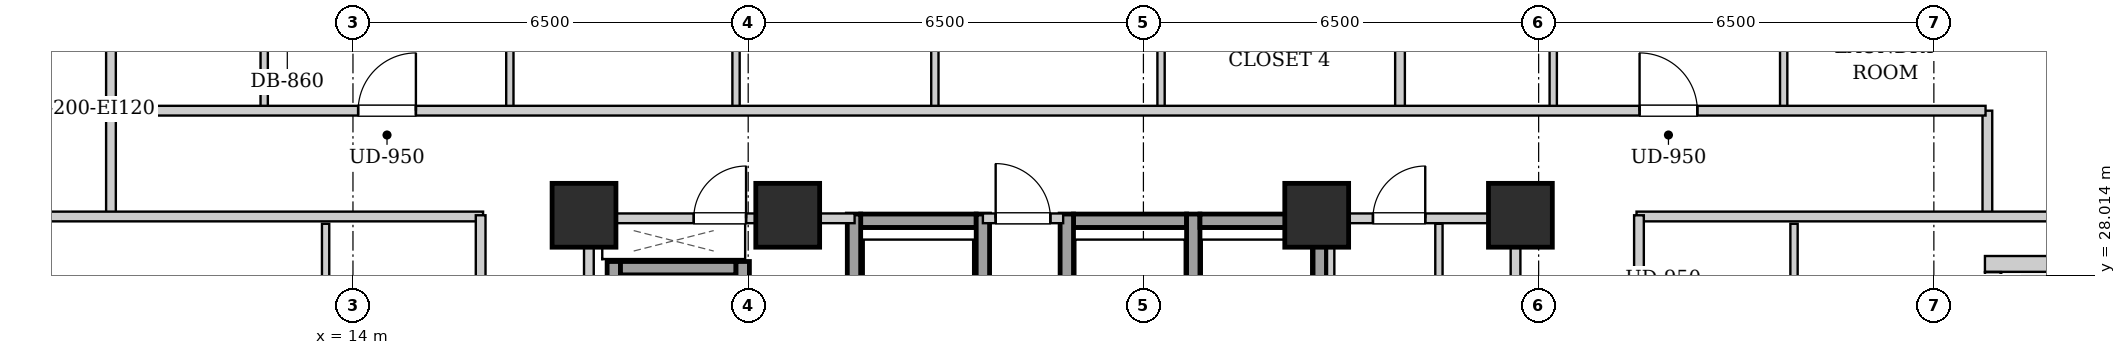
"""IFC4 building model, lengths in metres.
Left out: names, types, materials, properties, quantities, classifications, styles, units other than length and angle.
Written with IfcOpenShell. Run it as: python <this file> out.ifc"""

import sys

from ifc_helpers import new_model, si_unit, direction, frame, frame_2d, origin, origin_2d, place, context, subcontext, project, spatial, rectangle, extrude, element, fill, save


model = new_model("IFC4")
c1 = context("Model", 3, precision=1e-05, world=origin(), true_north=direction((0.0, 1.0)))
c2 = subcontext(c1, "Body", "Model", "MODEL_VIEW")
j1 = project(units=[si_unit("LENGTHUNIT", "METRE"), si_unit("PLANEANGLEUNIT", "RADIAN")], contexts=[c1])
p1 = place(None, origin())
s1 = spatial("IfcSite", under=j1, at=p1, CompositionType="ELEMENT")
p2 = place(p1, origin())
s2 = spatial("IfcBuilding", under=s1, at=p2, CompositionType="ELEMENT")
p3 = place(p2, frame((0.0, 0.0, 113.5)))
s3 = spatial("IfcBuildingStorey", under=s2, at=p3, CompositionType="ELEMENT", Elevation=113.5)
for number, where, z_axis, x_axis in (
    (1, (17.8, 29.0, 0.0), (0.0, 0.0, 1.0), (1.0, 0.0, 0.0)),
    (2, (21.15, 29.0, 0.0), (0.0, 0.0, 1.0), (1.0, 0.0, 0.0)),
    (3, (29.85, 29.0, 0.0), (0.0, 0.0, 1.0), (1.0, 0.0, 0.0)),
    (4, (33.2, 29.0, 0.0), (0.0, 0.0, 1.0), (1.0, 0.0, 0.0)),
):
    element("IfcColumn", number, at=place(p3, frame(where, z_axis=z_axis, x_axis=x_axis)), inside=s3, PredefinedType="COLUMN", context=c2, shape_type="SweptSolid", body=[
        extrude(rectangle(XDim=1.05, YDim=1.05, at=origin_2d()), origin(), (0.0, 0.0, 1.0), 3.2),
    ])
p4 = place(p3, frame((43.24, 28.2, 0.0), z_axis=(0.0, 0.0, 1.0), x_axis=(-1.0, 0.0, 0.0)))
e5 = element("IfcWall", 5, at=p4, inside=s3, PredefinedType="SOLIDWALL", context=c2, shape_type="SweptSolid", body=[
    extrude(rectangle(XDim=2.4, YDim=0.26, at=frame_2d((1.2, 0.0))), origin(), (0.0, 0.0, 1.0), 2.94),
])
p5 = place(p3, frame((40.97, 28.066, 0.0), z_axis=(0.0, 0.0, 1.0), x_axis=(0.0, -1.0, 0.0)))
e6 = element("IfcWall", 6, at=p5, inside=s3, PredefinedType="SOLIDWALL", context=c2, shape_type="SweptSolid", body=[
    extrude(rectangle(XDim=3.332, YDim=0.26, at=frame_2d((1.666, 0.0))), origin(), (0.0, 0.0, 1.0), 2.94),
])
p6 = place(p5, frame((1.116, 0.0, 0.0)))
e7 = element("IfcOpeningElement", 7, at=p6, cuts=e6, PredefinedType="OPENING", context=c2, shape_type="SweptSolid", body=[
    extrude(rectangle(XDim=1.1, YDim=2.0, at=frame_2d((0.55, 1.0))), frame((0.0, 0.14, 0.0), z_axis=(0.0, -1.0, 0.0), x_axis=(1.0, 0.0, 0.0)), (0.0, 0.0, 1.0), 0.28),
])
p7 = place(p5, frame((0.276, 0.0, 0.55)))
e8 = element("IfcOpeningElement", 8, at=p7, cuts=e6, PredefinedType="OPENING", context=c2, shape_type="SweptSolid", body=[
    extrude(rectangle(XDim=0.68, YDim=1.2, at=frame_2d((0.34, 0.6))), frame((0.0, 0.14, 0.0), z_axis=(0.0, -1.0, 0.0), x_axis=(1.0, 0.0, 0.0)), (0.0, 0.0, 1.0), 0.28),
])
p8 = place(p3, frame((22.35, 28.91, 0.0), z_axis=(0.0, 0.0, 1.0), x_axis=(1.0, 0.0, 0.0)))
e9 = element("IfcWall", 9, at=p8, inside=s3, PredefinedType="SHEAR", context=c2, shape_type="SweptSolid", body=[
    extrude(rectangle(XDim=1.9, YDim=0.22, at=frame_2d((0.95, 0.0))), origin(), (0.0, 0.0, 1.0), 2.94),
])
for number, where, z_axis, x_axis in (
    (10, (22.24, 26.58, 0.0), (0.0, 0.0, 1.0), (0.0, 1.0, 0.0)),
    (11, (24.36, 26.58, 0.0), (0.0, 0.0, 1.0), (0.0, 1.0, 0.0)),
):
    element("IfcWall", number, at=place(p3, frame(where, z_axis=z_axis, x_axis=x_axis)), inside=s3, PredefinedType="SHEAR", context=c2, shape_type="SweptSolid", body=[
        extrude(rectangle(XDim=2.44, YDim=0.22, at=frame_2d((1.22, 0.0))), origin(), (0.0, 0.0, 1.0), 2.94),
    ])
p9 = place(p3, frame((25.85, 28.91, 0.0), z_axis=(0.0, 0.0, 1.0), x_axis=(1.0, 0.0, 0.0)))
e12 = element("IfcWall", 12, at=p9, inside=s3, PredefinedType="SHEAR", context=c2, shape_type="SweptSolid", body=[
    extrude(rectangle(XDim=1.86, YDim=0.22, at=frame_2d((0.93, 0.0))), origin(), (0.0, 0.0, 1.0), 2.94),
])
for number, where, z_axis, x_axis in (
    (13, (25.74, 26.58, 0.0), (0.0, 0.0, 1.0), (0.0, 1.0, 0.0)),
    (14, (27.82, 26.58, 0.0), (0.0, 0.0, 1.0), (0.0, 1.0, 0.0)),
):
    element("IfcWall", number, at=place(p3, frame(where, z_axis=z_axis, x_axis=x_axis)), inside=s3, PredefinedType="SHEAR", context=c2, shape_type="SweptSolid", body=[
        extrude(rectangle(XDim=2.44, YDim=0.22, at=frame_2d((1.22, 0.0))), origin(), (0.0, 0.0, 1.0), 2.94),
    ])
p10 = place(p3, frame((27.93, 28.91, 0.0), z_axis=(0.0, 0.0, 1.0), x_axis=(1.0, 0.0, 0.0)))
e15 = element("IfcWall", 15, at=p10, inside=s3, PredefinedType="SHEAR", context=c2, shape_type="SweptSolid", body=[
    extrude(rectangle(XDim=1.86, YDim=0.22, at=frame_2d((0.93, 0.0))), origin(), (0.0, 0.0, 1.0), 2.94),
])
p11 = place(p3, frame((29.9, 26.58, 0.0), z_axis=(0.0, 0.0, 1.0), x_axis=(0.0, 1.0, 0.0)))
e16 = element("IfcWall", 16, at=p11, inside=s3, PredefinedType="SHEAR", context=c2, shape_type="SweptSolid", body=[
    extrude(rectangle(XDim=2.44, YDim=0.22, at=frame_2d((1.22, 0.0))), origin(), (0.0, 0.0, 1.0), 2.94),
])
p12 = place(p3, frame((18.29, 24.1, 0.0), z_axis=(0.0, 0.0, 1.0), x_axis=(0.0, 1.0, 0.0)))
e17 = element("IfcWall", 17, at=p12, inside=s3, PredefinedType="SHEAR", context=c2, shape_type="SweptSolid", body=[
    extrude(rectangle(XDim=4.14, YDim=0.22, at=frame_2d((2.07, 0.0))), origin(), (0.0, 0.0, 1.0), 2.94),
])
p13 = place(p3, frame((18.4, 28.13, 0.0), z_axis=(0.0, 0.0, 1.0), x_axis=(1.0, 0.0, 0.0)))
e18 = element("IfcWall", 18, at=p13, inside=s3, PredefinedType="SHEAR", context=c2, shape_type="SweptSolid", body=[
    extrude(rectangle(XDim=1.9, YDim=0.22, at=frame_2d((0.95, 0.0))), origin(), (0.0, 0.0, 1.0), 2.94),
])
p14 = place(p3, frame((20.41, 26.06, 0.0), z_axis=(0.0, 0.0, 1.0), x_axis=(0.0, 1.0, 0.0)))
e19 = element("IfcWall", 19, at=p14, inside=s3, PredefinedType="SHEAR", context=c2, shape_type="SweptSolid", body=[
    extrude(rectangle(XDim=2.18, YDim=0.22, at=frame_2d((1.09, 0.0))), origin(), (0.0, 0.0, 1.0), 2.94),
])
for number, where, z_axis, x_axis in (
    (20, (17.88, 24.12, 0.0), (0.0, 0.0, 1.0), (0.0, 1.0, 0.0)),
    (21, (33.12, 24.12, 0.0), (0.0, 0.0, 1.0), (0.0, 1.0, 0.0)),
):
    element("IfcWall", number, at=place(p3, frame(where, z_axis=z_axis, x_axis=x_axis)), inside=s3, PredefinedType="PARTITIONING", context=c2, shape_type="SweptSolid", body=[
        extrude(rectangle(XDim=4.76, YDim=0.16, at=frame_2d((2.38, 0.0))), origin(), (0.0, 0.0, 1.0), 2.94),
    ])
p15 = place(p3, frame((24.36, 28.95, 0.0), z_axis=(0.0, 0.0, 1.0), x_axis=(1.0, 0.0, 0.0)))
e22 = element("IfcWall", 22, at=p15, inside=s3, PredefinedType="PARTITIONING", context=c2, shape_type="SweptSolid", body=[
    extrude(rectangle(XDim=1.32, YDim=0.16, at=frame_2d((0.66, 0.0))), origin(), (0.0, 0.0, 1.0), 2.313),
])
p16 = place(p15, frame((0.21, 0.0, 0.0)))
e23 = element("IfcOpeningElement", 23, at=p16, cuts=e22, PredefinedType="OPENING", context=c2, shape_type="SweptSolid", body=[
    extrude(rectangle(XDim=0.9, YDim=2.05, at=frame_2d((0.45, 1.025))), frame((0.0, 0.09, 0.0), z_axis=(0.0, -1.0, 0.0), x_axis=(1.0, 0.0, 0.0)), (0.0, 0.0, 1.0), 0.18),
])
p17 = place(p3, frame((17.96, 28.95, 0.0), z_axis=(0.0, 0.0, 1.0), x_axis=(1.0, 0.0, 0.0)))
e24 = element("IfcWall", 24, at=p17, inside=s3, PredefinedType="PARTITIONING", context=c2, shape_type="SweptSolid", body=[
    extrude(rectangle(XDim=4.29, YDim=0.16, at=frame_2d((2.145, 0.0))), origin(), (0.0, 0.0, 1.0), 2.313),
])
p18 = place(p17, frame((1.645, 0.0, 0.0)))
e25 = element("IfcOpeningElement", 25, at=p18, cuts=e24, PredefinedType="OPENING", context=c2, shape_type="SweptSolid", body=[
    extrude(rectangle(XDim=0.86, YDim=2.05, at=frame_2d((0.43, 1.025))), frame((0.0, 0.09, 0.0), z_axis=(0.0, -1.0, 0.0), x_axis=(1.0, 0.0, 0.0)), (0.0, 0.0, 1.0), 0.18),
])
p19 = place(p3, frame((30.08, 26.18, 0.0), z_axis=(0.0, 0.0, 1.0), x_axis=(0.0, 1.0, 0.0)))
e26 = element("IfcWall", 26, at=p19, inside=s3, PredefinedType="PARTITIONING", context=c2, shape_type="SweptSolid", body=[
    extrude(rectangle(XDim=2.68, YDim=0.12, at=frame_2d((1.34, 0.0))), origin(), (0.0, 0.0, 1.0), 2.94),
])
p20 = place(p3, frame((31.86, 26.2, 0.0), z_axis=(0.0, 0.0, 1.0), x_axis=(0.0, 1.0, 0.0)))
e27 = element("IfcWall", 27, at=p20, inside=s3, PredefinedType="PARTITIONING", context=c2, shape_type="SweptSolid", body=[
    extrude(rectangle(XDim=2.66, YDim=0.12, at=frame_2d((1.33, 0.0))), origin(), (0.0, 0.0, 1.0), 2.94),
])
p21 = place(p20, frame((0.92, 0.0, 0.0)))
e28 = element("IfcOpeningElement", 28, at=p21, cuts=e27, PredefinedType="OPENING", context=c2, shape_type="SweptSolid", body=[
    extrude(rectangle(XDim=0.86, YDim=2.05, at=frame_2d((0.43, 1.025))), frame((0.0, 0.07, 0.0), z_axis=(0.0, -1.0, 0.0), x_axis=(1.0, 0.0, 0.0)), (0.0, 0.0, 1.0), 0.14),
])
p22 = place(p3, frame((30.08, 28.95, 0.0), z_axis=(0.0, 0.0, 1.0), x_axis=(1.0, 0.0, 0.0)))
e29 = element("IfcWall", 29, at=p22, inside=s3, PredefinedType="PARTITIONING", context=c2, shape_type="SweptSolid", body=[
    extrude(rectangle(XDim=2.96, YDim=0.16, at=frame_2d((1.48, 0.0))), origin(), (0.0, 0.0, 1.0), 2.94),
])
p23 = place(p22, frame((0.695, 0.0, 0.0)))
e30 = element("IfcOpeningElement", 30, at=p23, cuts=e29, PredefinedType="OPENING", context=c2, shape_type="SweptSolid", body=[
    extrude(rectangle(XDim=0.86, YDim=2.05, at=frame_2d((0.43, 1.025))), frame((0.0, 0.09, 0.0), z_axis=(0.0, -1.0, 0.0), x_axis=(1.0, 0.0, 0.0)), (0.0, 0.0, 1.0), 0.18),
])
for number, where, z_axis, x_axis in (
    (31, (10.02, 28.98, 0.0), (0.0, 0.0, 1.0), (0.0, 1.0, 0.0)),
    (32, (40.88, 28.98, 0.0), (0.0, 0.0, 1.0), (0.0, 1.0, 0.0)),
):
    element("IfcWall", number, at=place(p3, frame(where, z_axis=z_axis, x_axis=x_axis)), inside=s3, PredefinedType="PARTITIONING", context=c2, shape_type="SweptSolid", body=[
        extrude(rectangle(XDim=1.74, YDim=0.16, at=frame_2d((0.87, 0.0))), origin(), (0.0, 0.0, 1.0), 2.94),
    ])
p24 = place(p3, frame((7.78, 28.98, 0.0), z_axis=(0.0, 0.0, 1.0), x_axis=(1.0, 0.0, 0.0)))
e33 = element("IfcWall", 33, at=p24, inside=s3, PredefinedType="PARTITIONING", context=c2, shape_type="SweptSolid", body=[
    extrude(rectangle(XDim=8.36, YDim=0.16, at=frame_2d((4.18, 0.0))), origin(), (0.0, 0.0, 1.0), 2.313),
])
p25 = place(p3, frame((35.11, 28.98, 0.0), z_axis=(0.0, 0.0, 1.0), x_axis=(1.0, 0.0, 0.0)))
e34 = element("IfcWall", 34, at=p25, inside=s3, PredefinedType="PARTITIONING", context=c2, shape_type="SweptSolid", body=[
    extrude(rectangle(XDim=8.01, YDim=0.16, at=frame_2d((4.005, 0.0))), origin(), (0.0, 0.0, 1.0), 2.313),
])
p26 = place(p3, frame((10.02, 30.76, 0.0), z_axis=(0.0, 0.0, 1.0), x_axis=(0.0, 1.0, 0.0)))
e35 = element("IfcWall", 35, at=p26, inside=s3, PredefinedType="PARTITIONING", context=c2, shape_type="SweptSolid", body=[
    extrude(rectangle(XDim=2.91, YDim=0.16, at=frame_2d((1.455, 0.0))), origin(), (0.0, 0.0, 1.0), 2.94),
])
p27 = place(p3, frame((12.54, 30.76, 0.0), z_axis=(0.0, 0.0, 1.0), x_axis=(0.0, 1.0, 0.0)))
e36 = element("IfcWall", 36, at=p27, inside=s3, PredefinedType="PARTITIONING", context=c2, shape_type="SweptSolid", body=[
    extrude(rectangle(XDim=2.85, YDim=0.12, at=frame_2d((1.425, 0.0))), origin(), (0.0, 0.0, 1.0), 2.94),
])
p28 = place(p27, frame((0.995, 0.0, 0.0)))
e37 = element("IfcOpeningElement", 37, at=p28, cuts=e36, PredefinedType="OPENING", context=c2, shape_type="SweptSolid", body=[
    extrude(rectangle(XDim=0.86, YDim=2.05, at=frame_2d((0.43, 1.025))), frame((0.0, 0.07, 0.0), z_axis=(0.0, -1.0, 0.0), x_axis=(1.0, 0.0, 0.0)), (0.0, 0.0, 1.0), 0.14),
])
p29 = place(p3, frame((16.58, 30.76, 0.0), z_axis=(0.0, 0.0, 1.0), x_axis=(0.0, 1.0, 0.0)))
e38 = element("IfcWall", 38, at=p29, inside=s3, PredefinedType="PARTITIONING", context=c2, shape_type="SweptSolid", body=[
    extrude(rectangle(XDim=2.85, YDim=0.12, at=frame_2d((1.425, 0.0))), origin(), (0.0, 0.0, 1.0), 2.94),
])
p30 = place(p29, frame((0.975, 0.0, 0.0)))
e39 = element("IfcOpeningElement", 39, at=p30, cuts=e38, PredefinedType="OPENING", context=c2, shape_type="SweptSolid", body=[
    extrude(rectangle(XDim=0.9, YDim=2.05, at=frame_2d((0.45, 1.025))), frame((0.0, 0.07, 0.0), z_axis=(0.0, -1.0, 0.0), x_axis=(1.0, 0.0, 0.0)), (0.0, 0.0, 1.0), 0.14),
])
p31 = place(p3, frame((20.3, 30.76, 0.0), z_axis=(0.0, 0.0, 1.0), x_axis=(0.0, 1.0, 0.0)))
e40 = element("IfcWall", 40, at=p31, inside=s3, PredefinedType="PARTITIONING", context=c2, shape_type="SweptSolid", body=[
    extrude(rectangle(XDim=2.85, YDim=0.12, at=frame_2d((1.425, 0.0))), origin(), (0.0, 0.0, 1.0), 2.94),
])
p32 = place(p31, frame((0.975, 0.0, 0.0)))
e41 = element("IfcOpeningElement", 41, at=p32, cuts=e40, PredefinedType="OPENING", context=c2, shape_type="SweptSolid", body=[
    extrude(rectangle(XDim=0.9, YDim=2.05, at=frame_2d((0.45, 1.025))), frame((0.0, 0.07, 0.0), z_axis=(0.0, -1.0, 0.0), x_axis=(1.0, 0.0, 0.0)), (0.0, 0.0, 1.0), 0.14),
])
p33 = place(p3, frame((23.57, 30.76, 0.0), z_axis=(0.0, 0.0, 1.0), x_axis=(0.0, 1.0, 0.0)))
e42 = element("IfcWall", 42, at=p33, inside=s3, PredefinedType="PARTITIONING", context=c2, shape_type="SweptSolid", body=[
    extrude(rectangle(XDim=2.85, YDim=0.12, at=frame_2d((1.425, 0.0))), origin(), (0.0, 0.0, 1.0), 2.94),
])
p34 = place(p33, frame((0.975, 0.0, 0.0)))
e43 = element("IfcOpeningElement", 43, at=p34, cuts=e42, PredefinedType="OPENING", context=c2, shape_type="SweptSolid", body=[
    extrude(rectangle(XDim=0.9, YDim=2.05, at=frame_2d((0.45, 1.025))), frame((0.0, 0.07, 0.0), z_axis=(0.0, -1.0, 0.0), x_axis=(1.0, 0.0, 0.0)), (0.0, 0.0, 1.0), 0.14),
])
p35 = place(p3, frame((27.29, 30.76, 0.0), z_axis=(0.0, 0.0, 1.0), x_axis=(0.0, 1.0, 0.0)))
e44 = element("IfcWall", 44, at=p35, inside=s3, PredefinedType="PARTITIONING", context=c2, shape_type="SweptSolid", body=[
    extrude(rectangle(XDim=2.85, YDim=0.12, at=frame_2d((1.425, 0.0))), origin(), (0.0, 0.0, 1.0), 2.94),
])
p36 = place(p35, frame((0.975, 0.0, 0.0)))
e45 = element("IfcOpeningElement", 45, at=p36, cuts=e44, PredefinedType="OPENING", context=c2, shape_type="SweptSolid", body=[
    extrude(rectangle(XDim=0.9, YDim=2.05, at=frame_2d((0.45, 1.025))), frame((0.0, 0.07, 0.0), z_axis=(0.0, -1.0, 0.0), x_axis=(1.0, 0.0, 0.0)), (0.0, 0.0, 1.0), 0.14),
])
p37 = place(p3, frame((31.22, 30.76, 0.0), z_axis=(0.0, 0.0, 1.0), x_axis=(0.0, 1.0, 0.0)))
e46 = element("IfcWall", 46, at=p37, inside=s3, PredefinedType="PARTITIONING", context=c2, shape_type="SweptSolid", body=[
    extrude(rectangle(XDim=12.26, YDim=0.16, at=frame_2d((6.13, 0.0))), origin(), (0.0, 0.0, 1.0), 2.94),
])
p38 = place(p3, frame((33.74, 30.76, 0.0), z_axis=(0.0, 0.0, 1.0), x_axis=(0.0, 1.0, 0.0)))
e47 = element("IfcWall", 47, at=p38, inside=s3, PredefinedType="PARTITIONING", context=c2, shape_type="SweptSolid", body=[
    extrude(rectangle(XDim=2.85, YDim=0.12, at=frame_2d((1.425, 0.0))), origin(), (0.0, 0.0, 1.0), 2.94),
])
p39 = place(p38, frame((0.995, 0.0, 0.0)))
e48 = element("IfcOpeningElement", 48, at=p39, cuts=e47, PredefinedType="OPENING", context=c2, shape_type="SweptSolid", body=[
    extrude(rectangle(XDim=0.86, YDim=2.05, at=frame_2d((0.43, 1.025))), frame((0.0, 0.07, 0.0), z_axis=(0.0, -1.0, 0.0), x_axis=(1.0, 0.0, 0.0)), (0.0, 0.0, 1.0), 0.14),
])
p40 = place(p3, frame((37.53, 30.76, 0.0), z_axis=(0.0, 0.0, 1.0), x_axis=(0.0, 1.0, 0.0)))
e49 = element("IfcWall", 49, at=p40, inside=s3, PredefinedType="PARTITIONING", context=c2, shape_type="SweptSolid", body=[
    extrude(rectangle(XDim=2.85, YDim=0.12, at=frame_2d((1.425, 0.0))), origin(), (0.0, 0.0, 1.0), 2.94),
])
p41 = place(p40, frame((0.975, 0.0, 0.0)))
e50 = element("IfcOpeningElement", 50, at=p41, cuts=e49, PredefinedType="OPENING", context=c2, shape_type="SweptSolid", body=[
    extrude(rectangle(XDim=0.9, YDim=2.05, at=frame_2d((0.45, 1.025))), frame((0.0, 0.07, 0.0), z_axis=(0.0, -1.0, 0.0), x_axis=(1.0, 0.0, 0.0)), (0.0, 0.0, 1.0), 0.14),
])
p42 = place(p3, frame((13.55, 25.052, 0.0), z_axis=(0.0, 0.0, 1.0), x_axis=(0.0, 1.0, 0.0)))
e51 = element("IfcWall", 51, at=p42, inside=s3, PredefinedType="PARTITIONING", context=c2, shape_type="SweptSolid", body=[
    extrude(rectangle(XDim=3.808, YDim=0.12, at=frame_2d((1.904, 0.0))), origin(), (0.0, 0.0, 1.0), 2.94),
])
p43 = place(p42, frame((1.454, 0.0, 0.0)))
e52 = element("IfcOpeningElement", 52, at=p43, cuts=e51, PredefinedType="OPENING", context=c2, shape_type="SweptSolid", body=[
    extrude(rectangle(XDim=0.9, YDim=2.05, at=frame_2d((0.45, 1.025))), frame((0.0, 0.07, 0.0), z_axis=(0.0, -1.0, 0.0), x_axis=(1.0, 0.0, 0.0)), (0.0, 0.0, 1.0), 0.14),
])
p44 = place(p3, frame((37.7, 25.052, 0.0), z_axis=(0.0, 0.0, 1.0), x_axis=(0.0, 1.0, 0.0)))
e53 = element("IfcWall", 53, at=p44, inside=s3, PredefinedType="PARTITIONING", context=c2, shape_type="SweptSolid", body=[
    extrude(rectangle(XDim=3.808, YDim=0.12, at=frame_2d((1.904, 0.0))), origin(), (0.0, 0.0, 1.0), 2.94),
])
p45 = place(p44, frame((1.454, 0.0, 0.0)))
e54 = element("IfcOpeningElement", 54, at=p45, cuts=e53, PredefinedType="OPENING", context=c2, shape_type="SweptSolid", body=[
    extrude(rectangle(XDim=0.9, YDim=2.05, at=frame_2d((0.45, 1.025))), frame((0.0, 0.07, 0.0), z_axis=(0.0, -1.0, 0.0), x_axis=(1.0, 0.0, 0.0)), (0.0, 0.0, 1.0), 0.14),
])
p46 = place(p3, frame((10.05, 30.72, 0.0), z_axis=(0.0, 0.0, 1.0), x_axis=(1.0, 0.0, 0.0)))
e55 = element("IfcWall", 55, at=p46, inside=s3, PredefinedType="PARTITIONING", context=c2, shape_type="SweptSolid", body=[
    extrude(rectangle(XDim=30.8, YDim=0.16, at=frame_2d((15.4, 0.0))), origin(), (0.0, 0.0, 1.0), 2.94),
])
p47 = place(p46, frame((4.035, 0.0, 0.0)))
e56 = element("IfcOpeningElement", 56, at=p47, cuts=e55, PredefinedType="OPENING", context=c2, shape_type="SweptSolid", body=[
    extrude(rectangle(XDim=0.95, YDim=2.1, at=frame_2d((0.475, 1.05))), frame((0.0, 0.09, 0.0), z_axis=(0.0, -1.0, 0.0), x_axis=(1.0, 0.0, 0.0)), (0.0, 0.0, 1.0), 0.18),
])
p48 = place(p46, frame((25.11, 0.0, 0.0)))
e57 = element("IfcOpeningElement", 57, at=p48, cuts=e55, PredefinedType="OPENING", context=c2, shape_type="SweptSolid", body=[
    extrude(rectangle(XDim=0.95, YDim=2.1, at=frame_2d((0.475, 1.05))), frame((0.0, 0.09, 0.0), z_axis=(0.0, -1.0, 0.0), x_axis=(1.0, 0.0, 0.0)), (0.0, 0.0, 1.0), 0.18),
])
p49 = place(p3, frame((16.1, 15.07, 0.0), z_axis=(0.0, 0.0, 1.0), x_axis=(0.0, 1.0, 0.0)))
e58 = element("IfcWall", 58, at=p49, inside=s3, PredefinedType="PARTITIONING", context=c2, shape_type="SweptSolid", body=[
    extrude(rectangle(XDim=13.93, YDim=0.16, at=frame_2d((6.965, 0.0))), origin(), (0.0, 0.0, 1.0), 2.94),
])
p50 = place(p49, frame((4.661, 0.0, 0.0)))
e59 = element("IfcOpeningElement", 59, at=p50, cuts=e58, PredefinedType="OPENING", context=c2, shape_type="SweptSolid", body=[
    extrude(rectangle(XDim=0.95, YDim=2.1, at=frame_2d((0.475, 1.05))), frame((0.0, 0.09, 0.0), z_axis=(0.0, -1.0, 0.0), x_axis=(1.0, 0.0, 0.0)), (0.0, 0.0, 1.0), 0.18),
])
p51 = place(p49, frame((11.411, 0.0, 0.0)))
e60 = element("IfcOpeningElement", 60, at=p51, cuts=e58, PredefinedType="OPENING", context=c2, shape_type="SweptSolid", body=[
    extrude(rectangle(XDim=0.95, YDim=2.1, at=frame_2d((0.475, 1.05))), frame((0.0, 0.09, 0.0), z_axis=(0.0, -1.0, 0.0), x_axis=(1.0, 0.0, 0.0)), (0.0, 0.0, 1.0), 0.18),
])
p52 = place(p3, frame((35.15, 15.07, 0.0), z_axis=(0.0, 0.0, 1.0), x_axis=(0.0, 1.0, 0.0)))
e61 = element("IfcWall", 61, at=p52, inside=s3, PredefinedType="PARTITIONING", context=c2, shape_type="SweptSolid", body=[
    extrude(rectangle(XDim=13.93, YDim=0.16, at=frame_2d((6.965, 0.0))), origin(), (0.0, 0.0, 1.0), 2.94),
])
p53 = place(p52, frame((4.661, 0.0, 0.0)))
e62 = element("IfcOpeningElement", 62, at=p53, cuts=e61, PredefinedType="OPENING", context=c2, shape_type="SweptSolid", body=[
    extrude(rectangle(XDim=0.95, YDim=2.1, at=frame_2d((0.475, 1.05))), frame((0.0, 0.09, 0.0), z_axis=(0.0, -1.0, 0.0), x_axis=(1.0, 0.0, 0.0)), (0.0, 0.0, 1.0), 0.18),
])
p54 = place(p52, frame((11.411, 0.0, 0.0)))
e63 = element("IfcOpeningElement", 63, at=p54, cuts=e61, PredefinedType="OPENING", context=c2, shape_type="SweptSolid", body=[
    extrude(rectangle(XDim=0.95, YDim=2.1, at=frame_2d((0.475, 1.05))), frame((0.0, 0.09, 0.0), z_axis=(0.0, -1.0, 0.0), x_axis=(1.0, 0.0, 0.0)), (0.0, 0.0, 1.0), 0.18),
])
p55 = place(p16, origin())
e64 = element("IfcDoor", 64, at=p55, inside=s3, OperationType="SINGLE_SWING_LEFT", PredefinedType="DOOR", context=c2, shape_type="SweptSolid", body=[
    extrude(rectangle(XDim=0.9, YDim=2.05, at=frame_2d((0.45, 1.025))), frame((0.0, 0.025, 0.0), z_axis=(0.0, -1.0, 0.0), x_axis=(1.0, 0.0, 0.0)), (0.0, 0.0, 1.0), 0.05),
])
fill(e23, e64)
p56 = place(p18, origin())
e65 = element("IfcDoor", 65, at=p56, inside=s3, OperationType="SINGLE_SWING_RIGHT", PredefinedType="DOOR", context=c2, shape_type="SweptSolid", body=[
    extrude(rectangle(XDim=0.86, YDim=2.05, at=frame_2d((0.43, 1.025))), frame((0.0, 0.025, 0.0), z_axis=(0.0, -1.0, 0.0), x_axis=(1.0, 0.0, 0.0)), (0.0, 0.0, 1.0), 0.05),
])
fill(e25, e65)
p57 = place(p23, origin())
e66 = element("IfcDoor", 66, at=p57, inside=s3, OperationType="SINGLE_SWING_RIGHT", PredefinedType="DOOR", context=c2, shape_type="SweptSolid", body=[
    extrude(rectangle(XDim=0.86, YDim=2.05, at=frame_2d((0.43, 1.025))), frame((0.0, 0.025, 0.0), z_axis=(0.0, -1.0, 0.0), x_axis=(1.0, 0.0, 0.0)), (0.0, 0.0, 1.0), 0.05),
])
fill(e30, e66)
p58 = place(p47, origin())
e67 = element("IfcDoor", 67, at=p58, inside=s3, OperationType="SINGLE_SWING_RIGHT", PredefinedType="DOOR", context=c2, shape_type="SweptSolid", body=[
    extrude(rectangle(XDim=0.95, YDim=2.1, at=frame_2d((0.475, 1.05))), frame((0.0, 0.025, 0.0), z_axis=(0.0, -1.0, 0.0), x_axis=(1.0, 0.0, 0.0)), (0.0, 0.0, 1.0), 0.05),
])
fill(e56, e67)
p59 = place(p48, origin())
e68 = element("IfcDoor", 68, at=p59, inside=s3, OperationType="SINGLE_SWING_LEFT", PredefinedType="DOOR", context=c2, shape_type="SweptSolid", body=[
    extrude(rectangle(XDim=0.95, YDim=2.1, at=frame_2d((0.475, 1.05))), frame((0.0, 0.025, 0.0), z_axis=(0.0, -1.0, 0.0), x_axis=(1.0, 0.0, 0.0)), (0.0, 0.0, 1.0), 0.05),
])
fill(e57, e68)
save(model, sys.argv[1])
